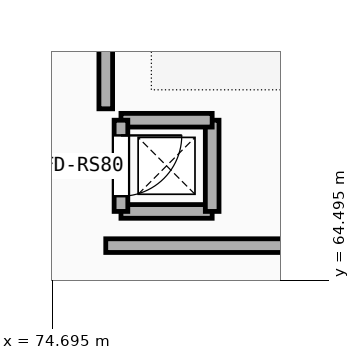
"""IFC4 building model, lengths in metres.
Left out: names, types, materials, properties, quantities, classifications, styles, units other than length and angle.
Written with IfcOpenShell. Run it as: python <this file> out.ifc"""

import sys

from ifc_helpers import new_model, si_unit, direction, frame, frame_2d, origin, place, context, subcontext, project, spatial, rectangle, extrude, element, fill, save


model = new_model("IFC4")
c1 = context("Model", 3, precision=1e-05, world=origin(), true_north=direction((0.0, 1.0)))
c2 = subcontext(c1, "Body", "Model", "MODEL_VIEW")
j1 = project(units=[si_unit("LENGTHUNIT", "METRE"), si_unit("PLANEANGLEUNIT", "RADIAN")], contexts=[c1])
p1 = place(None, origin())
s1 = spatial("IfcSite", under=j1, at=p1, CompositionType="ELEMENT")
p2 = place(p1, origin())
s2 = spatial("IfcBuilding", under=s1, at=p2, CompositionType="ELEMENT")
p3 = place(p2, frame((0.0, 0.0, 17.7)))
s3 = spatial("IfcBuildingStorey", under=s2, at=p3, CompositionType="ELEMENT", Elevation=17.7)
p4 = place(p3, frame((75.4, 64.95, 0.0), z_axis=(0.0, 0.0, 1.0), x_axis=(1.0, 0.0, 0.0)))
e1 = element("IfcWall", 1, at=p4, inside=s3, PredefinedType="PARTITIONING", context=c2, shape_type="SweptSolid", body=[
    extrude(rectangle(XDim=11.26, YDim=0.18, at=frame_2d((5.63, 0.0))), origin(), (0.0, 0.0, 1.0), 3.23),
])
p5 = place(p3, frame((75.4, 66.75, 0.0), z_axis=(0.0, 0.0, 1.0), x_axis=(0.0, 1.0, 0.0)))
e2 = element("IfcWall", 2, at=p5, inside=s3, PredefinedType="PARTITIONING", context=c2, shape_type="SweptSolid", body=[
    extrude(rectangle(XDim=30.75, YDim=0.18, at=frame_2d((15.375, 0.0))), origin(), (0.0, 0.0, 1.0), 3.32),
])
p6 = place(p5, frame((6.413, 0.0, -0.01)))
e3 = element("IfcOpeningElement", 3, at=p6, cuts=e2, PredefinedType="OPENING", context=c2, shape_type="SweptSolid", body=[
    extrude(rectangle(XDim=1.6, YDim=2.21, at=frame_2d((0.8, 1.105))), frame((0.0, 0.1, 0.0), z_axis=(0.0, -1.0, 0.0), x_axis=(1.0, 0.0, 0.0)), (0.0, 0.0, 1.0), 0.2),
])
p7 = place(p3, frame((75.6, 65.4, 0.0), z_axis=(0.0, 0.0, 1.0), x_axis=(1.0, 0.0, 0.0)))
e4 = element("IfcWall", 4, at=p7, inside=s3, PredefinedType="SOLIDWALL", context=c2, shape_type="SweptSolid", body=[
    extrude(rectangle(XDim=1.2, YDim=0.18, at=frame_2d((0.6, 0.0))), origin(), (0.0, 0.0, 1.0), 3.69),
])
p8 = place(p3, frame((76.8, 65.4, 0.0), z_axis=(0.0, 0.0, 1.0), x_axis=(0.0, 1.0, 0.0)))
e5 = element("IfcWall", 5, at=p8, inside=s3, PredefinedType="SOLIDWALL", context=c2, shape_type="SweptSolid", body=[
    extrude(rectangle(XDim=1.2, YDim=0.18, at=frame_2d((0.6, 0.0))), origin(), (0.0, 0.0, 1.0), 3.69),
])
p9 = place(p3, frame((76.8, 66.6, 0.0), z_axis=(0.0, 0.0, 1.0), x_axis=(-1.0, 0.0, 0.0)))
e6 = element("IfcWall", 6, at=p9, inside=s3, PredefinedType="SOLIDWALL", context=c2, shape_type="SweptSolid", body=[
    extrude(rectangle(XDim=1.2, YDim=0.18, at=frame_2d((0.6, 0.0))), origin(), (0.0, 0.0, 1.0), 3.69),
])
p10 = place(p3, frame((75.6, 66.6, 0.0), z_axis=(0.0, 0.0, 1.0), x_axis=(0.0, -1.0, 0.0)))
e7 = element("IfcWall", 7, at=p10, inside=s3, PredefinedType="SOLIDWALL", context=c2, shape_type="SweptSolid", body=[
    extrude(rectangle(XDim=1.2, YDim=0.18, at=frame_2d((0.6, 0.0))), origin(), (0.0, 0.0, 1.0), 3.69),
])
p11 = place(p10, frame((0.2, 0.0, -0.01)))
e8 = element("IfcOpeningElement", 8, at=p11, cuts=e7, PredefinedType="OPENING", context=c2, shape_type="SweptSolid", body=[
    extrude(rectangle(XDim=0.8, YDim=2.06, at=frame_2d((0.4, 1.03))), frame((0.0, 0.1, 0.0), z_axis=(0.0, -1.0, 0.0), x_axis=(1.0, 0.0, 0.0)), (0.0, 0.0, 1.0), 0.2),
])
p12 = place(p11, frame((0.0, 0.0, 0.01)))
e9 = element("IfcDoor", 9, at=p12, inside=s3, OperationType="SINGLE_SWING_LEFT", PredefinedType="DOOR", context=c2, shape_type="SweptSolid", body=[
    extrude(rectangle(XDim=0.8, YDim=2.05, at=frame_2d((0.4, 1.025))), frame((0.0, 0.025, 0.0), z_axis=(0.0, -1.0, 0.0), x_axis=(1.0, 0.0, 0.0)), (0.0, 0.0, 1.0), 0.05),
])
fill(e8, e9)
save(model, sys.argv[1])
